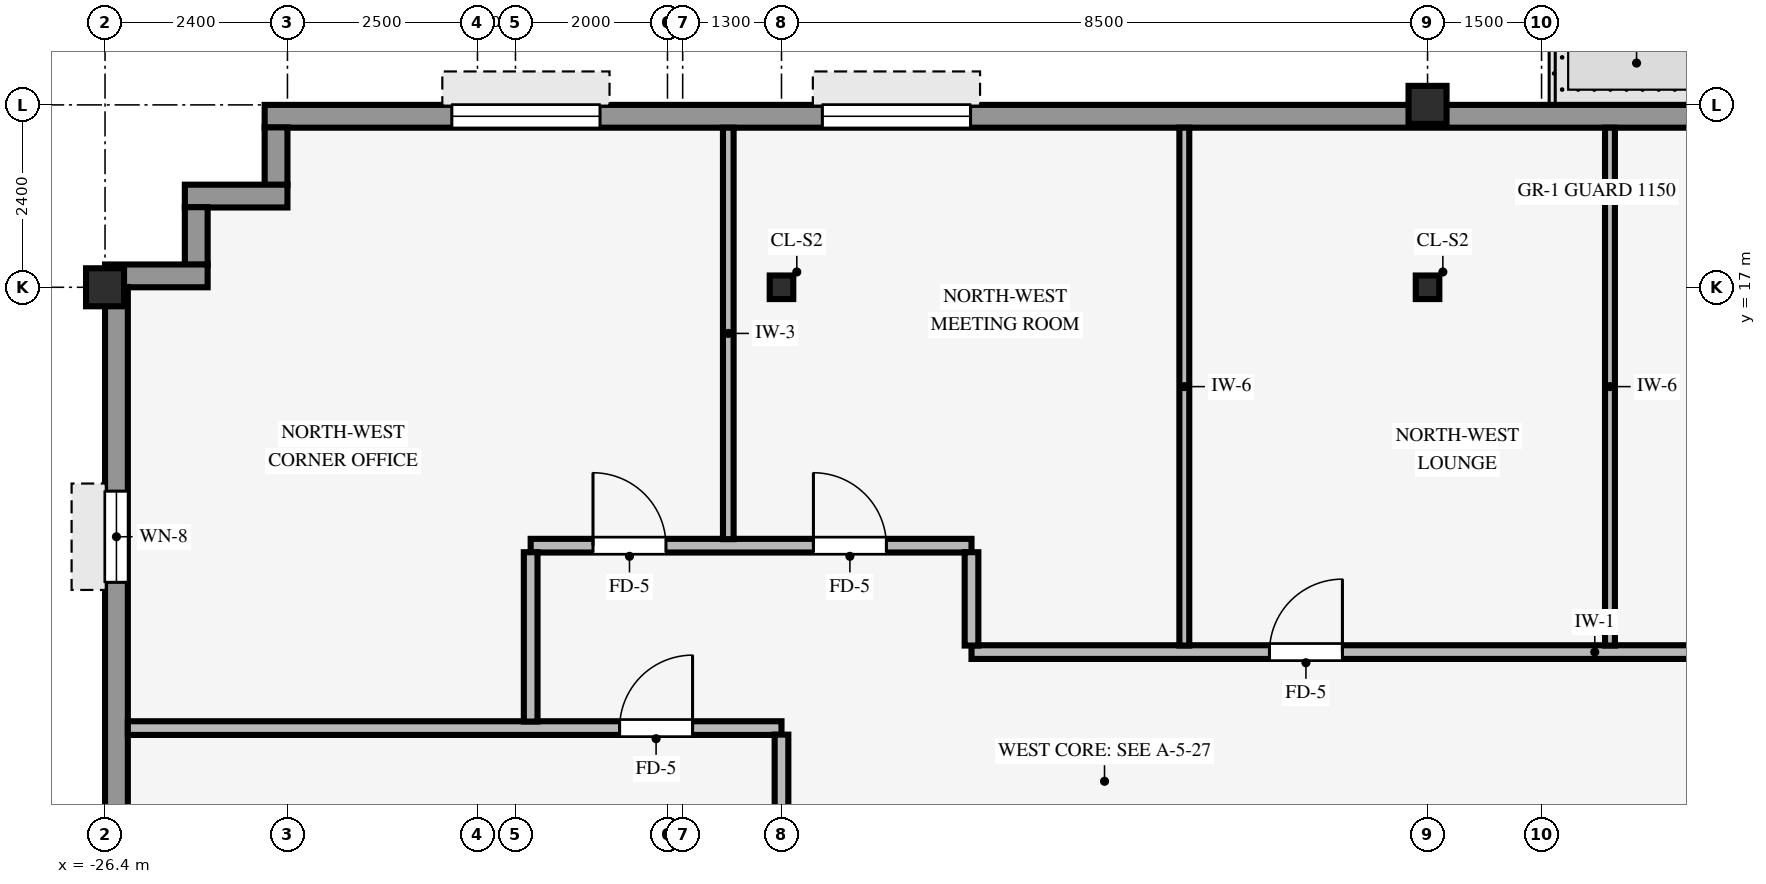
"""IFC4 building model, lengths in metres.
Left out: names, types, materials, properties, quantities, classifications, styles, units other than length and angle.
Written with IfcOpenShell. Run it as: python <this file> out.ifc"""

import sys

from ifc_helpers import new_model, si_unit, direction, frame, frame_2d, origin, origin_2d, place, context, subcontext, project, spatial, rectangle, hollow_rectangle, i_section, extrude, source, transform, mapped, element, fill, save


model = new_model("IFC4")
c1 = context("Model", 3, precision=1e-05, world=origin(), true_north=direction((0.0, 1.0)))
c2 = subcontext(c1, "Body", "Model", "MODEL_VIEW")
j1 = project(units=[si_unit("LENGTHUNIT", "METRE"), si_unit("PLANEANGLEUNIT", "RADIAN")], contexts=[c1])
p1 = place(None, origin())
s1 = spatial("IfcSite", under=j1, at=p1, CompositionType="ELEMENT")
p2 = place(p1, origin())
s2 = spatial("IfcBuilding", under=s1, at=p2, CompositionType="ELEMENT")
p3 = place(p2, frame((0.0, 0.0, 234.7)))
s3 = spatial("IfcBuildingStorey", under=s2, at=p3, CompositionType="ELEMENT", Elevation=234.7)
for number, where, z_axis, x_axis in (
    (1, (-26.4, 17.0, 0.0), (0.0, 0.0, 1.0), (1.0, 0.0, 0.0)),
    (2, (-9.0, 19.4, 0.0), (0.0, 0.0, 1.0), (1.0, 0.0, 0.0)),
):
    element("IfcColumn", number, at=place(p3, frame(where, z_axis=z_axis, x_axis=x_axis)), inside=s3, PredefinedType="COLUMN", context=c2, shape_type="SweptSolid", body=[
        extrude(hollow_rectangle(XDim=0.5, YDim=0.5, WallThickness=0.032, InnerFilletRadius=0.032, OuterFilletRadius=0.064, at=origin_2d()), origin(), (0.0, 0.0, 1.0), 3.37),
    ])
for number, where, z_axis, x_axis in (
    (3, (-17.5, 17.0, 0.0), (0.0, 0.0, 1.0), (1.0, 0.0, 0.0)),
    (4, (-9.0, 17.0, 0.0), (0.0, 0.0, 1.0), (1.0, 0.0, 0.0)),
):
    element("IfcColumn", number, at=place(p3, frame(where, z_axis=z_axis, x_axis=x_axis)), inside=s3, PredefinedType="COLUMN", context=c2, shape_type="SweptSolid", body=[
        extrude(i_section(OverallWidth=0.31, OverallDepth=0.31, WebThickness=0.015, FlangeThickness=0.015, FilletRadius=0.015, at=origin_2d()), origin(), (0.0, 0.0, 1.0), 3.37),
    ])
p4 = place(p3, frame((-24.3, 19.25, 0.0), z_axis=(0.0, 0.0, 1.0), x_axis=(1.0, 0.0, 0.0)))
e5 = element("IfcWall", 5, at=p4, inside=s3, PredefinedType="STANDARD", context=c2, shape_type="SweptSolid", body=[
    extrude(rectangle(XDim=41.0, YDim=0.3, at=frame_2d((20.5, 0.0))), origin(), (0.0, 0.0, 1.0), 2.705),
])
p5 = place(p4, frame((19.0, 0.0, 0.0)))
e6 = element("IfcOpeningElement", 6, at=p5, cuts=e5, PredefinedType="OPENING", context=c2, shape_type="SweptSolid", body=[
    extrude(rectangle(XDim=0.98, YDim=2.15, at=frame_2d((0.49, 1.075))), frame((0.0, 0.16, 0.0), z_axis=(0.0, -1.0, 0.0), x_axis=(1.0, 0.0, 0.0)), (0.0, 0.0, 1.0), 0.32),
])
p6 = place(p4, frame((2.462, 0.0, 0.8)))
e7 = element("IfcOpeningElement", 7, at=p6, cuts=e5, PredefinedType="OPENING", context=c2, shape_type="SweptSolid", body=[
    extrude(rectangle(XDim=1.95, YDim=1.48, at=frame_2d((0.975, 0.74))), frame((0.0, 0.16, 0.0), z_axis=(0.0, -1.0, 0.0), x_axis=(1.0, 0.0, 0.0)), (0.0, 0.0, 1.0), 0.32),
])
p7 = place(p4, frame((7.337, 0.0, 0.8)))
e8 = element("IfcOpeningElement", 8, at=p7, cuts=e5, PredefinedType="OPENING", context=c2, shape_type="SweptSolid", body=[
    extrude(rectangle(XDim=1.95, YDim=1.48, at=frame_2d((0.975, 0.74))), frame((0.0, 0.16, 0.0), z_axis=(0.0, -1.0, 0.0), x_axis=(1.0, 0.0, 0.0)), (0.0, 0.0, 1.0), 0.32),
])
p8 = place(p4, frame((21.512, 0.0, 0.8)))
e9 = element("IfcOpeningElement", 9, at=p8, cuts=e5, PredefinedType="OPENING", context=c2, shape_type="SweptSolid", body=[
    extrude(rectangle(XDim=1.95, YDim=1.48, at=frame_2d((0.975, 0.74))), frame((0.0, 0.16, 0.0), z_axis=(0.0, -1.0, 0.0), x_axis=(1.0, 0.0, 0.0)), (0.0, 0.0, 1.0), 0.32),
])
p9 = place(p4, frame((26.837, 0.0, 0.8)))
e10 = element("IfcOpeningElement", 10, at=p9, cuts=e5, PredefinedType="OPENING", context=c2, shape_type="SweptSolid", body=[
    extrude(rectangle(XDim=1.95, YDim=1.48, at=frame_2d((0.975, 0.74))), frame((0.0, 0.16, 0.0), z_axis=(0.0, -1.0, 0.0), x_axis=(1.0, 0.0, 0.0)), (0.0, 0.0, 1.0), 0.32),
])
p10 = place(p4, frame((37.038, 0.0, 0.8)))
e11 = element("IfcOpeningElement", 11, at=p10, cuts=e5, PredefinedType="OPENING", context=c2, shape_type="SweptSolid", body=[
    extrude(rectangle(XDim=1.95, YDim=1.48, at=frame_2d((0.975, 0.74))), frame((0.0, 0.16, 0.0), z_axis=(0.0, -1.0, 0.0), x_axis=(1.0, 0.0, 0.0)), (0.0, 0.0, 1.0), 0.32),
])
p11 = place(p3, frame((-24.15, 18.346, 0.0), z_axis=(0.0, 0.0, 1.0), x_axis=(0.0, 1.0, 0.0)))
e12 = element("IfcWall", 12, at=p11, inside=s3, PredefinedType="STANDARD", context=c2, shape_type="SweptSolid", body=[
    extrude(rectangle(XDim=0.758, YDim=0.3, at=frame_2d((0.379, 0.0))), origin(), (0.0, 0.0, 1.0), 2.892),
])
p12 = place(p3, frame((-25.35, 18.2, 0.0), z_axis=(0.0, 0.0, 1.0), x_axis=(1.0, 0.0, 0.0)))
e13 = element("IfcWall", 13, at=p12, inside=s3, PredefinedType="STANDARD", context=c2, shape_type="SweptSolid", body=[
    extrude(rectangle(XDim=1.35, YDim=0.3, at=frame_2d((0.675, 0.0))), origin(), (0.0, 0.0, 1.0), 2.892),
])
p13 = place(p3, frame((-25.2, 17.296, 0.0), z_axis=(0.0, 0.0, 1.0), x_axis=(0.0, 1.0, 0.0)))
e14 = element("IfcWall", 14, at=p13, inside=s3, PredefinedType="STANDARD", context=c2, shape_type="SweptSolid", body=[
    extrude(rectangle(XDim=0.758, YDim=0.3, at=frame_2d((0.379, 0.0))), origin(), (0.0, 0.0, 1.0), 2.892),
])
p14 = place(p3, frame((-26.4, 17.15, 0.0), z_axis=(0.0, 0.0, 1.0), x_axis=(1.0, 0.0, 0.0)))
e15 = element("IfcWall", 15, at=p14, inside=s3, PredefinedType="STANDARD", context=c2, shape_type="SweptSolid", body=[
    extrude(rectangle(XDim=1.35, YDim=0.3, at=frame_2d((0.675, 0.0))), origin(), (0.0, 0.0, 1.0), 2.892),
])
p15 = place(p3, frame((-26.25, -17.004, 0.0), z_axis=(0.0, 0.0, 1.0), x_axis=(0.0, 1.0, 0.0)))
e16 = element("IfcWall", 16, at=p15, inside=s3, PredefinedType="STANDARD", context=c2, shape_type="SweptSolid", body=[
    extrude(rectangle(XDim=34.008, YDim=0.3, at=frame_2d((17.004, 0.0))), origin(), (0.0, 0.0, 1.0), 2.705),
])
p16 = place(p15, frame((2.686, 0.0, 0.8)))
e17 = element("IfcOpeningElement", 17, at=p16, cuts=e16, PredefinedType="OPENING", context=c2, shape_type="SweptSolid", body=[
    extrude(rectangle(XDim=1.2, YDim=1.48, at=frame_2d((0.6, 0.74))), frame((0.0, 0.16, 0.0), z_axis=(0.0, -1.0, 0.0), x_axis=(1.0, 0.0, 0.0)), (0.0, 0.0, 1.0), 0.32),
])
p17 = place(p15, frame((8.159, 0.0, 0.8)))
e18 = element("IfcOpeningElement", 18, at=p17, cuts=e16, PredefinedType="OPENING", context=c2, shape_type="SweptSolid", body=[
    extrude(rectangle(XDim=1.2, YDim=1.48, at=frame_2d((0.6, 0.74))), frame((0.0, 0.16, 0.0), z_axis=(0.0, -1.0, 0.0), x_axis=(1.0, 0.0, 0.0)), (0.0, 0.0, 1.0), 0.32),
])
p18 = place(p15, frame((11.831, 0.0, 0.8)))
e19 = element("IfcOpeningElement", 19, at=p18, cuts=e16, PredefinedType="OPENING", context=c2, shape_type="SweptSolid", body=[
    extrude(rectangle(XDim=1.2, YDim=1.48, at=frame_2d((0.6, 0.74))), frame((0.0, 0.16, 0.0), z_axis=(0.0, -1.0, 0.0), x_axis=(1.0, 0.0, 0.0)), (0.0, 0.0, 1.0), 0.32),
])
p19 = place(p15, frame((17.754, 0.0, 0.8)))
e20 = element("IfcOpeningElement", 20, at=p19, cuts=e16, PredefinedType="OPENING", context=c2, shape_type="SweptSolid", body=[
    extrude(rectangle(XDim=1.2, YDim=1.48, at=frame_2d((0.6, 0.74))), frame((0.0, 0.16, 0.0), z_axis=(0.0, -1.0, 0.0), x_axis=(1.0, 0.0, 0.0)), (0.0, 0.0, 1.0), 0.32),
])
p20 = place(p15, frame((20.977, 0.0, 0.8)))
e21 = element("IfcOpeningElement", 21, at=p20, cuts=e16, PredefinedType="OPENING", context=c2, shape_type="SweptSolid", body=[
    extrude(rectangle(XDim=1.2, YDim=1.48, at=frame_2d((0.6, 0.74))), frame((0.0, 0.16, 0.0), z_axis=(0.0, -1.0, 0.0), x_axis=(1.0, 0.0, 0.0)), (0.0, 0.0, 1.0), 0.32),
])
p21 = place(p15, frame((24.649, 0.0, 0.8)))
e22 = element("IfcOpeningElement", 22, at=p21, cuts=e16, PredefinedType="OPENING", context=c2, shape_type="SweptSolid", body=[
    extrude(rectangle(XDim=1.2, YDim=1.48, at=frame_2d((0.6, 0.74))), frame((0.0, 0.16, 0.0), z_axis=(0.0, -1.0, 0.0), x_axis=(1.0, 0.0, 0.0)), (0.0, 0.0, 1.0), 0.32),
])
p22 = place(p15, frame((30.122, 0.0, 0.8)))
e23 = element("IfcOpeningElement", 23, at=p22, cuts=e16, PredefinedType="OPENING", context=c2, shape_type="SweptSolid", body=[
    extrude(rectangle(XDim=1.2, YDim=1.48, at=frame_2d((0.6, 0.74))), frame((0.0, 0.16, 0.0), z_axis=(0.0, -1.0, 0.0), x_axis=(1.0, 0.0, 0.0)), (0.0, 0.0, 1.0), 0.32),
])
p23 = place(p3, frame((-26.1, 11.2, 0.0), z_axis=(0.0, 0.0, 1.0), x_axis=(1.0, 0.0, 0.0)))
e24 = element("IfcWall", 24, at=p23, inside=s3, PredefinedType="PARTITIONING", context=c2, shape_type="SweptSolid", body=[
    extrude(rectangle(XDim=8.6, YDim=0.18, at=frame_2d((4.3, 0.0))), origin(), (0.0, 0.0, 1.0), 3.36),
])
p24 = place(p23, frame((6.47, 0.0, 0.0)))
e25 = element("IfcOpeningElement", 25, at=p24, cuts=e24, PredefinedType="OPENING", context=c2, shape_type="SweptSolid", body=[
    extrude(rectangle(XDim=0.96, YDim=2.1, at=frame_2d((0.48, 1.05))), frame((0.0, 0.1, 0.0), z_axis=(0.0, -1.0, 0.0), x_axis=(1.0, 0.0, 0.0)), (0.0, 0.0, 1.0), 0.2),
])
p25 = place(p3, frame((-15.0, 12.2, 0.0), z_axis=(0.0, 0.0, 1.0), x_axis=(1.0, 0.0, 0.0)))
e26 = element("IfcWall", 26, at=p25, inside=s3, PredefinedType="PARTITIONING", context=c2, shape_type="SweptSolid", body=[
    extrude(rectangle(XDim=30.8, YDim=0.18, at=frame_2d((15.4, 0.0))), origin(), (0.0, 0.0, 1.0), 3.36),
])
p26 = place(p25, frame((11.52, 0.0, 0.0)))
e27 = element("IfcOpeningElement", 27, at=p26, cuts=e26, PredefinedType="OPENING", context=c2, shape_type="SweptSolid", body=[
    extrude(rectangle(XDim=0.96, YDim=2.1, at=frame_2d((0.48, 1.05))), frame((0.0, 0.1, 0.0), z_axis=(0.0, -1.0, 0.0), x_axis=(1.0, 0.0, 0.0)), (0.0, 0.0, 1.0), 0.2),
])
p27 = place(p25, frame((25.22, 0.0, 0.0)))
e28 = element("IfcOpeningElement", 28, at=p27, cuts=e26, PredefinedType="OPENING", context=c2, shape_type="SweptSolid", body=[
    extrude(rectangle(XDim=0.96, YDim=2.1, at=frame_2d((0.48, 1.05))), frame((0.0, 0.1, 0.0), z_axis=(0.0, -1.0, 0.0), x_axis=(1.0, 0.0, 0.0)), (0.0, 0.0, 1.0), 0.2),
])
p28 = place(p25, frame((28.62, 0.0, 0.0)))
e29 = element("IfcOpeningElement", 29, at=p28, cuts=e26, PredefinedType="OPENING", context=c2, shape_type="SweptSolid", body=[
    extrude(rectangle(XDim=0.96, YDim=2.1, at=frame_2d((0.48, 1.05))), frame((0.0, 0.1, 0.0), z_axis=(0.0, -1.0, 0.0), x_axis=(1.0, 0.0, 0.0)), (0.0, 0.0, 1.0), 0.2),
])
p29 = place(p25, frame((3.92, 0.0, 0.0)))
e30 = element("IfcOpeningElement", 30, at=p29, cuts=e26, PredefinedType="OPENING", context=c2, shape_type="SweptSolid", body=[
    extrude(rectangle(XDim=0.96, YDim=2.1, at=frame_2d((0.48, 1.05))), frame((0.0, 0.1, 0.0), z_axis=(0.0, -1.0, 0.0), x_axis=(1.0, 0.0, 0.0)), (0.0, 0.0, 1.0), 0.2),
])
p30 = place(p25, frame((16.2, 0.0, 0.0)))
e31 = element("IfcOpeningElement", 31, at=p30, cuts=e26, PredefinedType="OPENING", context=c2, shape_type="SweptSolid", body=[
    extrude(rectangle(XDim=0.9, YDim=2.1, at=frame_2d((0.45, 1.05))), frame((0.0, 0.1, 0.0), z_axis=(0.0, -1.0, 0.0), x_axis=(1.0, 0.0, 0.0)), (0.0, 0.0, 1.0), 0.2),
])
p31 = place(p25, frame((18.3, 0.0, 0.0)))
e32 = element("IfcOpeningElement", 32, at=p31, cuts=e26, PredefinedType="OPENING", context=c2, shape_type="SweptSolid", body=[
    extrude(rectangle(XDim=0.9, YDim=2.1, at=frame_2d((0.45, 1.05))), frame((0.0, 0.1, 0.0), z_axis=(0.0, -1.0, 0.0), x_axis=(1.0, 0.0, 0.0)), (0.0, 0.0, 1.0), 0.2),
])
p32 = place(p25, frame((20.25, 0.0, 0.0)))
e33 = element("IfcOpeningElement", 33, at=p32, cuts=e26, PredefinedType="OPENING", context=c2, shape_type="SweptSolid", body=[
    extrude(rectangle(XDim=0.9, YDim=2.1, at=frame_2d((0.45, 1.05))), frame((0.0, 0.1, 0.0), z_axis=(0.0, -1.0, 0.0), x_axis=(1.0, 0.0, 0.0)), (0.0, 0.0, 1.0), 0.2),
])
p33 = place(p3, frame((-20.8, 13.6, 0.0), z_axis=(0.0, 0.0, 1.0), x_axis=(1.0, 0.0, 0.0)))
e34 = element("IfcWall", 34, at=p33, inside=s3, PredefinedType="PARTITIONING", context=c2, shape_type="SweptSolid", body=[
    extrude(rectangle(XDim=5.8, YDim=0.18, at=frame_2d((2.9, 0.0))), origin(), (0.0, 0.0, 1.0), 3.049),
])
p34 = place(p33, frame((3.72, 0.0, 0.0)))
e35 = element("IfcOpeningElement", 35, at=p34, cuts=e34, PredefinedType="OPENING", context=c2, shape_type="SweptSolid", body=[
    extrude(rectangle(XDim=0.96, YDim=2.1, at=frame_2d((0.48, 1.05))), frame((0.0, 0.1, 0.0), z_axis=(0.0, -1.0, 0.0), x_axis=(1.0, 0.0, 0.0)), (0.0, 0.0, 1.0), 0.2),
])
p35 = place(p33, frame((0.82, 0.0, 0.0)))
e36 = element("IfcOpeningElement", 36, at=p35, cuts=e34, PredefinedType="OPENING", context=c2, shape_type="SweptSolid", body=[
    extrude(rectangle(XDim=0.96, YDim=2.1, at=frame_2d((0.48, 1.05))), frame((0.0, 0.1, 0.0), z_axis=(0.0, -1.0, 0.0), x_axis=(1.0, 0.0, 0.0)), (0.0, 0.0, 1.0), 0.2),
])
p36 = place(p3, frame((-20.8, 11.286, 0.0), z_axis=(0.0, 0.0, 1.0), x_axis=(0.0, 1.0, 0.0)))
e37 = element("IfcWall", 37, at=p36, inside=s3, PredefinedType="PARTITIONING", context=c2, shape_type="SweptSolid", body=[
    extrude(rectangle(XDim=2.228, YDim=0.18, at=frame_2d((1.114, 0.0))), origin(), (0.0, 0.0, 1.0), 3.36),
])
p37 = place(p3, frame((-18.2, 13.686, 0.0), z_axis=(0.0, 0.0, 1.0), x_axis=(0.0, 1.0, 0.0)))
e38 = element("IfcWall", 38, at=p37, inside=s3, PredefinedType="PARTITIONING", context=c2, shape_type="SweptSolid", body=[
    extrude(rectangle(XDim=5.414, YDim=0.14, at=frame_2d((2.707, 0.0))), origin(), (0.0, 0.0, 1.0), 3.36),
])
p38 = place(p3, frame((-17.5, 9.996, 0.0), z_axis=(0.0, 0.0, 1.0), x_axis=(0.0, 1.0, 0.0)))
e39 = element("IfcWall", 39, at=p38, inside=s3, PredefinedType="PARTITIONING", context=c2, shape_type="SweptSolid", body=[
    extrude(rectangle(XDim=1.118, YDim=0.18, at=frame_2d((0.559, 0.0))), origin(), (0.0, 0.0, 1.0), 2.892),
])
p39 = place(p3, frame((-15.0, 12.286, 0.0), z_axis=(0.0, 0.0, 1.0), x_axis=(0.0, 1.0, 0.0)))
e40 = element("IfcWall", 40, at=p39, inside=s3, PredefinedType="PARTITIONING", context=c2, shape_type="SweptSolid", body=[
    extrude(rectangle(XDim=1.228, YDim=0.18, at=frame_2d((0.614, 0.0))), origin(), (0.0, 0.0, 1.0), 3.36),
])
for number, where, z_axis, x_axis in (
    (41, (-12.2, 12.286, 0.0), (0.0, 0.0, 1.0), (0.0, 1.0, 0.0)),
    (42, (-6.6, 12.286, 0.0), (0.0, 0.0, 1.0), (0.0, 1.0, 0.0)),
):
    element("IfcWall", number, at=place(p3, frame(where, z_axis=z_axis, x_axis=x_axis)), inside=s3, PredefinedType="PARTITIONING", context=c2, shape_type="SweptSolid", body=[
        extrude(rectangle(XDim=6.814, YDim=0.13, at=frame_2d((3.407, 0.0))), origin(), (0.0, 0.0, 1.0), 3.36),
    ])
m1 = source(origin(), c2, "Body", "SweptSolid", [
    extrude(rectangle(XDim=1.95, YDim=1.48, at=frame_2d((0.975, 0.74))), frame((0.0, 0.03, 0.0), z_axis=(0.0, -1.0, 0.0), x_axis=(1.0, 0.0, 0.0)), (0.0, 0.0, 1.0), 0.06),
])
p40 = place(p6, origin())
e43 = element("IfcWindow", 43, at=p40, inside=s3, PartitioningType="SINGLE_PANEL", PredefinedType="WINDOW", context=c2, shape_type="MappedRepresentation", body=[
    mapped(m1, transform((0.0, 0.0, 0.0), scale=1.0)),
])
fill(e7, e43)
p41 = place(p7, origin())
e44 = element("IfcWindow", 44, at=p41, inside=s3, PartitioningType="SINGLE_PANEL", PredefinedType="WINDOW", context=c2, shape_type="MappedRepresentation", body=[
    mapped(m1, transform((0.0, 0.0, 0.0), scale=1.0)),
])
fill(e8, e44)
m2 = source(origin(), c2, "Body", "SweptSolid", [
    extrude(rectangle(XDim=1.2, YDim=1.48, at=frame_2d((0.6, 0.74))), frame((0.0, 0.03, 0.0), z_axis=(0.0, -1.0, 0.0), x_axis=(1.0, 0.0, 0.0)), (0.0, 0.0, 1.0), 0.06),
])
p42 = place(p22, origin())
e45 = element("IfcWindow", 45, at=p42, inside=s3, PartitioningType="SINGLE_PANEL", PredefinedType="WINDOW", context=c2, shape_type="MappedRepresentation", body=[
    mapped(m2, transform((0.0, 0.0, 0.0), scale=1.0)),
])
fill(e23, e45)
m3 = source(origin(), c2, "Body", "SweptSolid", [
    extrude(rectangle(XDim=0.96, YDim=2.1, at=frame_2d((0.48, 1.05))), frame((0.0, 0.025, 0.0), z_axis=(0.0, -1.0, 0.0), x_axis=(1.0, 0.0, 0.0)), (0.0, 0.0, 1.0), 0.05),
])
p43 = place(p24, origin())
e46 = element("IfcDoor", 46, at=p43, inside=s3, OperationType="SINGLE_SWING_RIGHT", PredefinedType="DOOR", context=c2, shape_type="MappedRepresentation", body=[
    mapped(m3, transform((0.0, 0.0, 0.0), scale=1.0)),
])
fill(e25, e46)
p44 = place(p34, origin())
e47 = element("IfcDoor", 47, at=p44, inside=s3, OperationType="SINGLE_SWING_LEFT", PredefinedType="DOOR", context=c2, shape_type="MappedRepresentation", body=[
    mapped(m3, transform((0.0, 0.0, 0.0), scale=1.0)),
])
fill(e35, e47)
p45 = place(p29, origin())
e48 = element("IfcDoor", 48, at=p45, inside=s3, OperationType="SINGLE_SWING_RIGHT", PredefinedType="DOOR", context=c2, shape_type="MappedRepresentation", body=[
    mapped(m3, transform((0.0, 0.0, 0.0), scale=1.0)),
])
fill(e30, e48)
p46 = place(p35, origin())
e49 = element("IfcDoor", 49, at=p46, inside=s3, OperationType="SINGLE_SWING_LEFT", PredefinedType="DOOR", context=c2, shape_type="MappedRepresentation", body=[
    mapped(m3, transform((0.0, 0.0, 0.0), scale=1.0)),
])
fill(e36, e49)
save(model, sys.argv[1])
